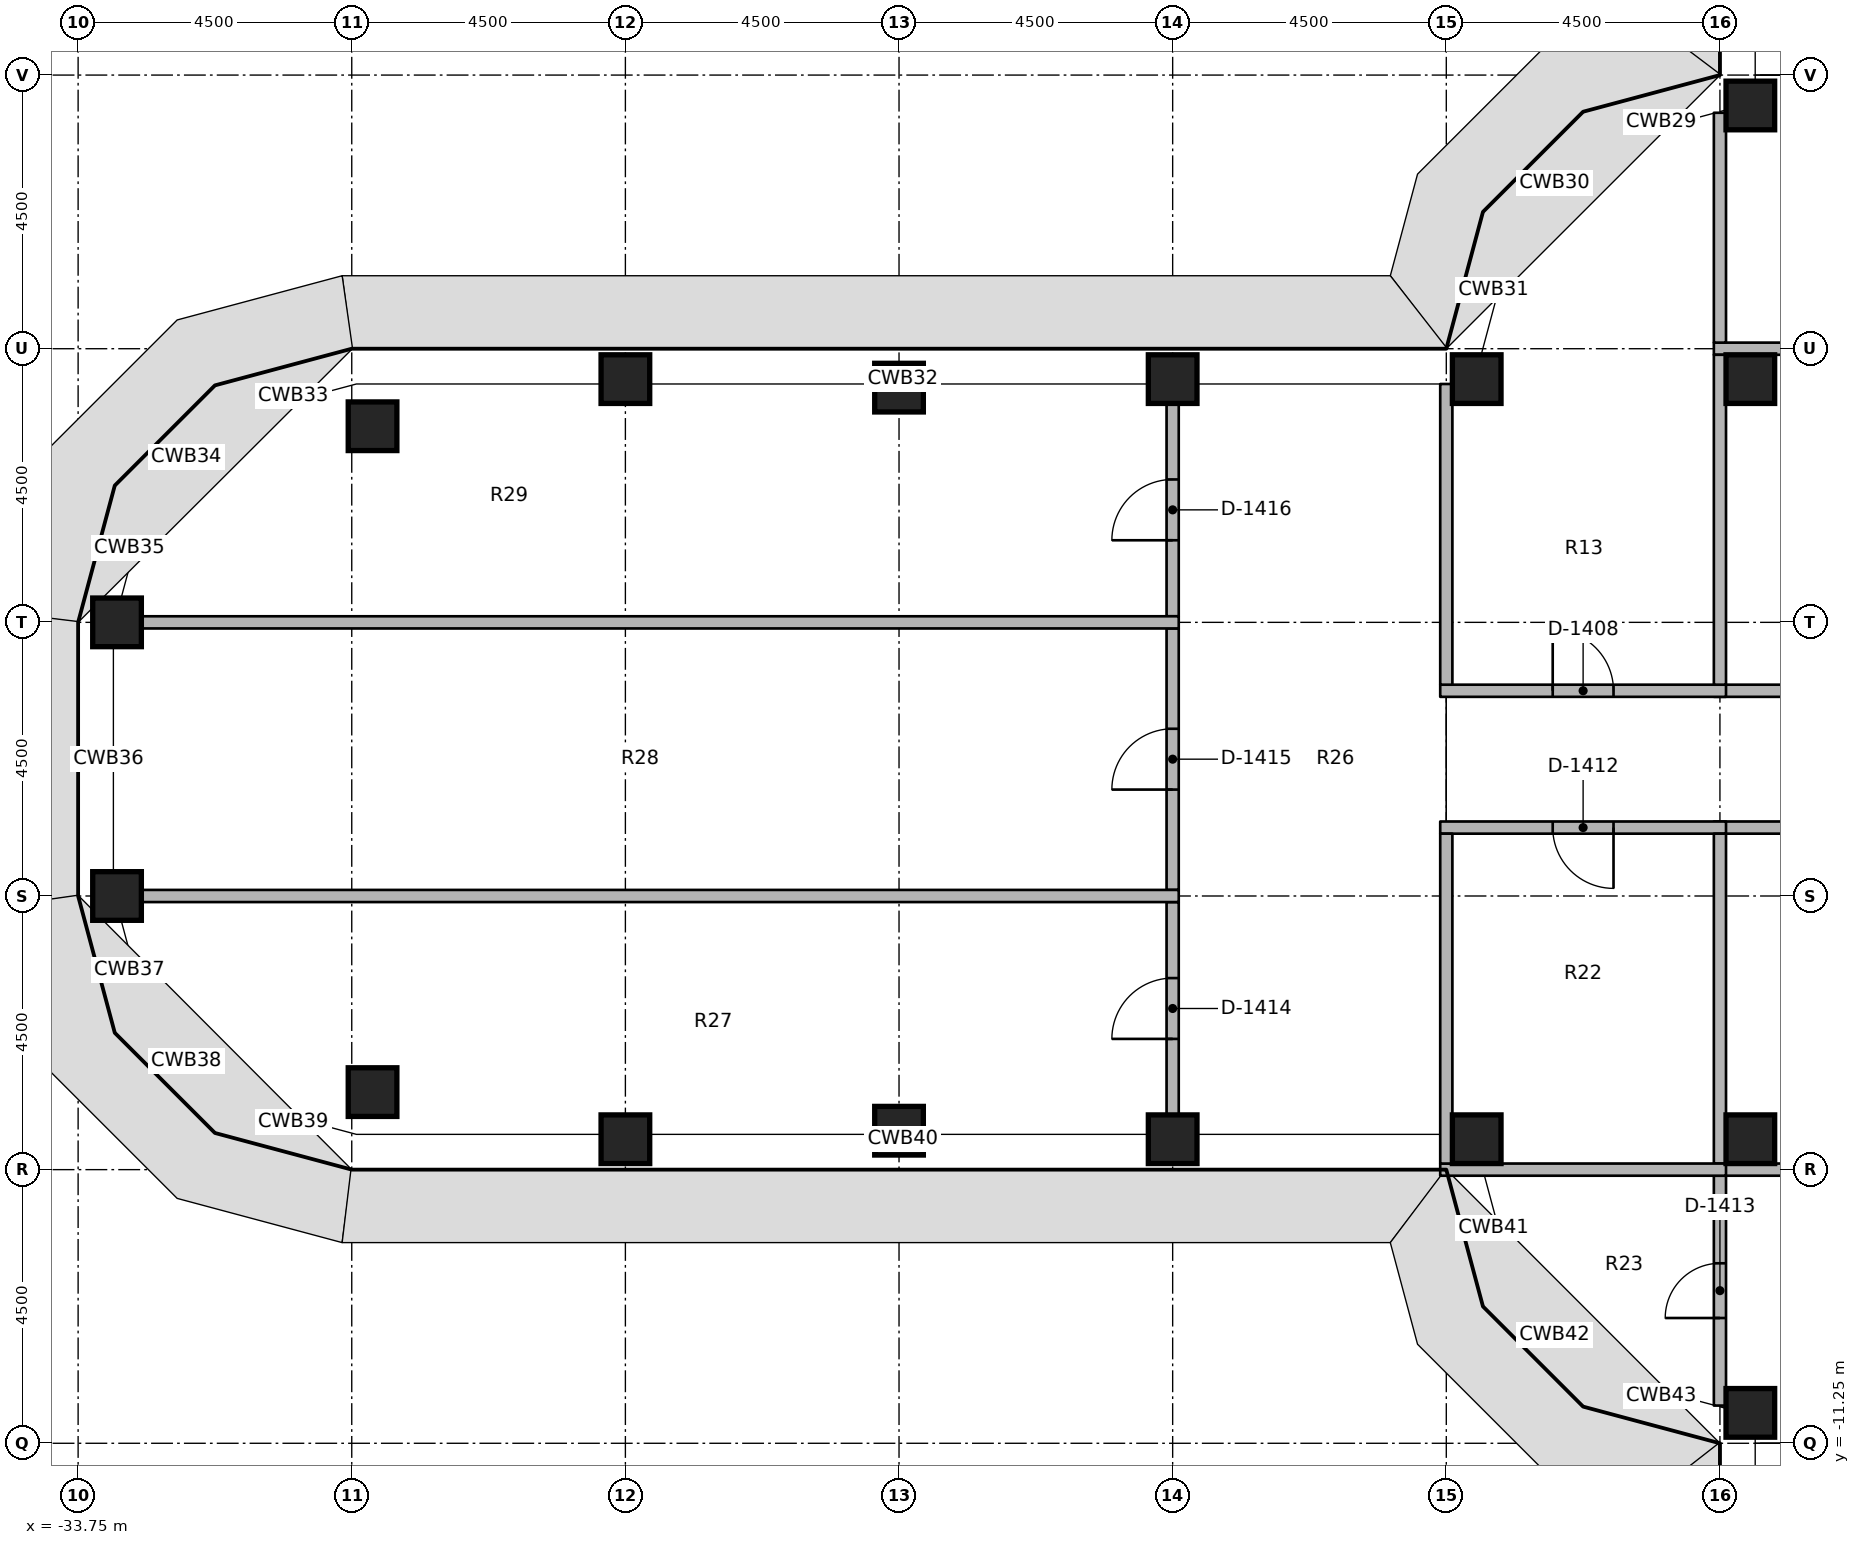
"""IFC4 building model, lengths in metres.
Left out: names, types, materials, properties, quantities, classifications, styles, units other than length and angle.
Written with IfcOpenShell. Run it as: python <this file> out.ifc"""

import sys

from ifc_helpers import new_model, si_unit, direction, frame, frame_2d, origin, origin_2d, place, context, subcontext, project, spatial, rectangle, extrude, element, fill, save


model = new_model("IFC4")
c1 = context("Model", 3, precision=1e-05, world=origin(), true_north=direction((0.0, 1.0)))
c2 = subcontext(c1, "Body", "Model", "MODEL_VIEW")
j1 = project(units=[si_unit("LENGTHUNIT", "METRE"), si_unit("PLANEANGLEUNIT", "RADIAN")], contexts=[c1])
p1 = place(None, origin())
s1 = spatial("IfcSite", under=j1, at=p1, CompositionType="ELEMENT")
p2 = place(p1, origin())
s2 = spatial("IfcBuilding", under=s1, at=p2, CompositionType="ELEMENT")
p3 = place(p2, frame((0.0, 0.0, 141.0)))
s3 = spatial("IfcBuildingStorey", under=s2, at=p3, CompositionType="ELEMENT", Elevation=141.0)
for number, where, z_axis, x_axis in (
    (1, (-33.11, -2.25, 0.0), (0.0, 0.0, 1.0), (1.0, 0.0, 0.0)),
    (2, (-33.11, 2.25, 0.0), (0.0, 0.0, 1.0), (1.0, 0.0, 0.0)),
    (3, (-28.908, -5.475, 0.0), (0.0, 0.0, 1.0), (1.0, 0.0, 0.0)),
    (4, (-28.908, 5.475, 0.0), (0.0, 0.0, 1.0), (1.0, 0.0, 0.0)),
    (5, (-24.75, -6.25, 0.0), (0.0, 0.0, 1.0), (1.0, 0.0, 0.0)),
    (6, (-24.75, 6.25, 0.0), (0.0, 0.0, 1.0), (1.0, 0.0, 0.0)),
    (7, (-20.25, -6.11, 0.0), (0.0, 0.0, 1.0), (1.0, 0.0, 0.0)),
    (8, (-20.25, 6.11, 0.0), (0.0, 0.0, 1.0), (1.0, 0.0, 0.0)),
    (9, (-15.75, -6.25, 0.0), (0.0, 0.0, 1.0), (1.0, 0.0, 0.0)),
    (10, (-15.75, 6.25, 0.0), (0.0, 0.0, 1.0), (1.0, 0.0, 0.0)),
    (11, (-10.75, -6.25, 0.0), (0.0, 0.0, 1.0), (1.0, 0.0, 0.0)),
    (12, (-10.75, 6.25, 0.0), (0.0, 0.0, 1.0), (1.0, 0.0, 0.0)),
    (13, (-6.25, -10.75, 0.0), (0.0, 0.0, 1.0), (1.0, 0.0, 0.0)),
    (14, (-6.25, -6.25, 0.0), (0.0, 0.0, 1.0), (1.0, 0.0, 0.0)),
    (15, (-6.25, 6.25, 0.0), (0.0, 0.0, 1.0), (1.0, 0.0, 0.0)),
    (16, (-6.25, 10.75, 0.0), (0.0, 0.0, 1.0), (1.0, 0.0, 0.0)),
):
    element("IfcColumn", number, at=place(p3, frame(where, z_axis=z_axis, x_axis=x_axis)), inside=s3, PredefinedType="COLUMN", context=c2, shape_type="SweptSolid", body=[
        extrude(rectangle(XDim=0.8, YDim=0.8, at=origin_2d()), origin(), (0.0, 0.0, 1.0), 3.65),
    ])
p4 = place(p3, frame((-6.85, 1.125, 0.0), z_axis=(0.0, 0.0, 1.0), x_axis=(1.0, 0.0, 0.0)))
e17 = element("IfcWall", 17, at=p4, inside=s3, PredefinedType="PARTITIONING", context=c2, shape_type="SweptSolid", body=[
    extrude(rectangle(XDim=5.825, YDim=0.2, at=frame_2d((2.913, 0.0))), origin(), (0.0, 0.0, 1.0), 2.75),
])
p5 = place(p4, frame((2.413, 0.0, 0.0)))
e18 = element("IfcOpeningElement", 18, at=p5, cuts=e17, PredefinedType="OPENING", context=c2, shape_type="SweptSolid", body=[
    extrude(rectangle(XDim=1.0, YDim=2.1, at=frame_2d((0.5, 1.05))), frame((0.0, 0.11, 0.0), z_axis=(0.0, -1.0, 0.0), x_axis=(1.0, 0.0, 0.0)), (0.0, 0.0, 1.0), 0.22),
])
p6 = place(p3, frame((-11.35, 1.125, 0.0), z_axis=(0.0, 0.0, 1.0), x_axis=(1.0, 0.0, 0.0)))
e19 = element("IfcWall", 19, at=p6, inside=s3, PredefinedType="PARTITIONING", context=c2, shape_type="SweptSolid", body=[
    extrude(rectangle(XDim=4.7, YDim=0.2, at=frame_2d((2.35, 0.0))), origin(), (0.0, 0.0, 1.0), 2.75),
])
p7 = place(p6, frame((1.85, 0.0, 0.0)))
e20 = element("IfcOpeningElement", 20, at=p7, cuts=e19, PredefinedType="OPENING", context=c2, shape_type="SweptSolid", body=[
    extrude(rectangle(XDim=1.0, YDim=2.1, at=frame_2d((0.5, 1.05))), frame((0.0, 0.11, 0.0), z_axis=(0.0, -1.0, 0.0), x_axis=(1.0, 0.0, 0.0)), (0.0, 0.0, 1.0), 0.22),
])
p8 = place(p3, frame((-1.025, -1.125, 0.0), z_axis=(0.0, 0.0, 1.0), x_axis=(-1.0, 0.0, 0.0)))
e21 = element("IfcWall", 21, at=p8, inside=s3, PredefinedType="PARTITIONING", context=c2, shape_type="SweptSolid", body=[
    extrude(rectangle(XDim=5.825, YDim=0.2, at=frame_2d((2.913, 0.0))), origin(), (0.0, 0.0, 1.0), 2.75),
])
p9 = place(p8, frame((2.413, 0.0, 0.0)))
e22 = element("IfcOpeningElement", 22, at=p9, cuts=e21, PredefinedType="OPENING", context=c2, shape_type="SweptSolid", body=[
    extrude(rectangle(XDim=1.0, YDim=2.1, at=frame_2d((0.5, 1.05))), frame((0.0, 0.11, 0.0), z_axis=(0.0, -1.0, 0.0), x_axis=(1.0, 0.0, 0.0)), (0.0, 0.0, 1.0), 0.22),
])
p10 = place(p3, frame((-6.65, -1.125, 0.0), z_axis=(0.0, 0.0, 1.0), x_axis=(-1.0, 0.0, 0.0)))
e23 = element("IfcWall", 23, at=p10, inside=s3, PredefinedType="PARTITIONING", context=c2, shape_type="SweptSolid", body=[
    extrude(rectangle(XDim=4.7, YDim=0.2, at=frame_2d((2.35, 0.0))), origin(), (0.0, 0.0, 1.0), 2.75),
])
p11 = place(p10, frame((1.85, 0.0, 0.0)))
e24 = element("IfcOpeningElement", 24, at=p11, cuts=e23, PredefinedType="OPENING", context=c2, shape_type="SweptSolid", body=[
    extrude(rectangle(XDim=1.0, YDim=2.1, at=frame_2d((0.5, 1.05))), frame((0.0, 0.11, 0.0), z_axis=(0.0, -1.0, 0.0), x_axis=(1.0, 0.0, 0.0)), (0.0, 0.0, 1.0), 0.22),
])
p12 = place(p3, frame((-6.85, 6.75, 0.0), z_axis=(0.0, 0.0, 1.0), x_axis=(1.0, 0.0, 0.0)))
e25 = element("IfcWall", 25, at=p12, inside=s3, PredefinedType="PARTITIONING", context=c2, shape_type="SweptSolid", body=[
    extrude(rectangle(XDim=5.825, YDim=0.2, at=frame_2d((2.913, 0.0))), origin(), (0.0, 0.0, 1.0), 2.75),
])
p13 = place(p3, frame((-6.75, 6.85, 0.0), z_axis=(0.0, 0.0, 1.0), x_axis=(0.0, 1.0, 0.0)))
e26 = element("IfcWall", 26, at=p13, inside=s3, PredefinedType="PARTITIONING", context=c2, shape_type="SweptSolid", body=[
    extrude(rectangle(XDim=3.78, YDim=0.2, at=frame_2d((1.89, 0.0))), origin(), (0.0, 0.0, 1.0), 2.75),
])
p14 = place(p3, frame((-6.85, -6.75, 0.0), z_axis=(0.0, 0.0, 1.0), x_axis=(1.0, 0.0, 0.0)))
e27 = element("IfcWall", 27, at=p14, inside=s3, PredefinedType="PARTITIONING", context=c2, shape_type="SweptSolid", body=[
    extrude(rectangle(XDim=5.825, YDim=0.2, at=frame_2d((2.913, 0.0))), origin(), (0.0, 0.0, 1.0), 2.75),
])
p15 = place(p3, frame((-6.75, -10.63, 0.0), z_axis=(0.0, 0.0, 1.0), x_axis=(0.0, 1.0, 0.0)))
e28 = element("IfcWall", 28, at=p15, inside=s3, PredefinedType="PARTITIONING", context=c2, shape_type="SweptSolid", body=[
    extrude(rectangle(XDim=3.78, YDim=0.2, at=frame_2d((1.89, 0.0))), origin(), (0.0, 0.0, 1.0), 2.75),
])
p16 = place(p15, frame((1.44, 0.0, 0.0)))
e29 = element("IfcOpeningElement", 29, at=p16, cuts=e28, PredefinedType="OPENING", context=c2, shape_type="SweptSolid", body=[
    extrude(rectangle(XDim=0.9, YDim=2.1, at=frame_2d((0.45, 1.05))), frame((0.0, 0.11, 0.0), z_axis=(0.0, -1.0, 0.0), x_axis=(1.0, 0.0, 0.0)), (0.0, 0.0, 1.0), 0.22),
])
p17 = place(p3, frame((-6.75, 1.225, 0.0), z_axis=(0.0, 0.0, 1.0), x_axis=(0.0, 1.0, 0.0)))
e30 = element("IfcWall", 30, at=p17, inside=s3, PredefinedType="PARTITIONING", context=c2, shape_type="SweptSolid", body=[
    extrude(rectangle(XDim=5.425, YDim=0.2, at=frame_2d((2.712, 0.0))), origin(), (0.0, 0.0, 1.0), 2.75),
])
p18 = place(p3, frame((-11.25, 1.225, 0.0), z_axis=(0.0, 0.0, 1.0), x_axis=(0.0, 1.0, 0.0)))
e31 = element("IfcWall", 31, at=p18, inside=s3, PredefinedType="PARTITIONING", context=c2, shape_type="SweptSolid", body=[
    extrude(rectangle(XDim=4.945, YDim=0.2, at=frame_2d((2.472, 0.0))), origin(), (0.0, 0.0, 1.0), 2.75),
])
p19 = place(p3, frame((-6.75, -6.65, 0.0), z_axis=(0.0, 0.0, 1.0), x_axis=(0.0, 1.0, 0.0)))
e32 = element("IfcWall", 32, at=p19, inside=s3, PredefinedType="PARTITIONING", context=c2, shape_type="SweptSolid", body=[
    extrude(rectangle(XDim=5.425, YDim=0.2, at=frame_2d((2.712, 0.0))), origin(), (0.0, 0.0, 1.0), 2.75),
])
p20 = place(p3, frame((-11.35, -6.75, 0.0), z_axis=(0.0, 0.0, 1.0), x_axis=(1.0, 0.0, 0.0)))
e33 = element("IfcWall", 33, at=p20, inside=s3, PredefinedType="PARTITIONING", context=c2, shape_type="SweptSolid", body=[
    extrude(rectangle(XDim=4.7, YDim=0.2, at=frame_2d((2.35, 0.0))), origin(), (0.0, 0.0, 1.0), 2.75),
])
p21 = place(p3, frame((-11.25, -6.65, 0.0), z_axis=(0.0, 0.0, 1.0), x_axis=(0.0, 1.0, 0.0)))
e34 = element("IfcWall", 34, at=p21, inside=s3, PredefinedType="PARTITIONING", context=c2, shape_type="SweptSolid", body=[
    extrude(rectangle(XDim=5.425, YDim=0.2, at=frame_2d((2.712, 0.0))), origin(), (0.0, 0.0, 1.0), 2.75),
])
p22 = place(p3, frame((-15.75, -5.85, 0.0), z_axis=(0.0, 0.0, 1.0), x_axis=(0.0, 1.0, 0.0)))
e35 = element("IfcWall", 35, at=p22, inside=s3, PredefinedType="PARTITIONING", context=c2, shape_type="SweptSolid", body=[
    extrude(rectangle(XDim=3.5, YDim=0.2, at=frame_2d((1.75, 0.0))), origin(), (0.0, 0.0, 1.0), 2.75),
])
p23 = place(p22, frame((1.25, 0.0, 0.0)))
e36 = element("IfcOpeningElement", 36, at=p23, cuts=e35, PredefinedType="OPENING", context=c2, shape_type="SweptSolid", body=[
    extrude(rectangle(XDim=1.0, YDim=2.1, at=frame_2d((0.5, 1.05))), frame((0.0, 0.11, 0.0), z_axis=(0.0, -1.0, 0.0), x_axis=(1.0, 0.0, 0.0)), (0.0, 0.0, 1.0), 0.22),
])
p24 = place(p3, frame((-15.75, -2.15, 0.0), z_axis=(0.0, 0.0, 1.0), x_axis=(0.0, 1.0, 0.0)))
e37 = element("IfcWall", 37, at=p24, inside=s3, PredefinedType="PARTITIONING", context=c2, shape_type="SweptSolid", body=[
    extrude(rectangle(XDim=4.3, YDim=0.2, at=frame_2d((2.15, 0.0))), origin(), (0.0, 0.0, 1.0), 2.75),
])
p25 = place(p24, frame((1.65, 0.0, 0.0)))
e38 = element("IfcOpeningElement", 38, at=p25, cuts=e37, PredefinedType="OPENING", context=c2, shape_type="SweptSolid", body=[
    extrude(rectangle(XDim=1.0, YDim=2.1, at=frame_2d((0.5, 1.05))), frame((0.0, 0.11, 0.0), z_axis=(0.0, -1.0, 0.0), x_axis=(1.0, 0.0, 0.0)), (0.0, 0.0, 1.0), 0.22),
])
p26 = place(p3, frame((-15.75, 2.35, 0.0), z_axis=(0.0, 0.0, 1.0), x_axis=(0.0, 1.0, 0.0)))
e39 = element("IfcWall", 39, at=p26, inside=s3, PredefinedType="PARTITIONING", context=c2, shape_type="SweptSolid", body=[
    extrude(rectangle(XDim=3.5, YDim=0.2, at=frame_2d((1.75, 0.0))), origin(), (0.0, 0.0, 1.0), 2.75),
])
p27 = place(p26, frame((1.25, 0.0, 0.0)))
e40 = element("IfcOpeningElement", 40, at=p27, cuts=e39, PredefinedType="OPENING", context=c2, shape_type="SweptSolid", body=[
    extrude(rectangle(XDim=1.0, YDim=2.1, at=frame_2d((0.5, 1.05))), frame((0.0, 0.11, 0.0), z_axis=(0.0, -1.0, 0.0), x_axis=(1.0, 0.0, 0.0)), (0.0, 0.0, 1.0), 0.22),
])
for number, where, z_axis, x_axis in (
    (41, (-32.71, -2.25, 0.0), (0.0, 0.0, 1.0), (1.0, 0.0, 0.0)),
    (42, (-32.71, 2.25, 0.0), (0.0, 0.0, 1.0), (1.0, 0.0, 0.0)),
):
    element("IfcWall", number, at=place(p3, frame(where, z_axis=z_axis, x_axis=x_axis)), inside=s3, PredefinedType="PARTITIONING", context=c2, shape_type="SweptSolid", body=[
        extrude(rectangle(XDim=17.06, YDim=0.2, at=frame_2d((8.53, 0.0))), origin(), (0.0, 0.0, 1.0), 2.75),
    ])
p28 = place(p7, origin())
e43 = element("IfcDoor", 43, at=p28, inside=s3, OperationType="SINGLE_SWING_RIGHT", PredefinedType="DOOR", context=c2, shape_type="SweptSolid", body=[
    extrude(rectangle(XDim=1.0, YDim=2.1, at=frame_2d((0.5, 1.05))), frame((0.0, 0.025, 0.0), z_axis=(0.0, -1.0, 0.0), x_axis=(1.0, 0.0, 0.0)), (0.0, 0.0, 1.0), 0.05),
])
fill(e20, e43)
p29 = place(p11, origin())
e44 = element("IfcDoor", 44, at=p29, inside=s3, OperationType="SINGLE_SWING_RIGHT", PredefinedType="DOOR", context=c2, shape_type="SweptSolid", body=[
    extrude(rectangle(XDim=1.0, YDim=2.1, at=frame_2d((0.5, 1.05))), frame((0.0, 0.025, 0.0), z_axis=(0.0, -1.0, 0.0), x_axis=(1.0, 0.0, 0.0)), (0.0, 0.0, 1.0), 0.05),
])
fill(e24, e44)
p30 = place(p16, origin())
e45 = element("IfcDoor", 45, at=p30, inside=s3, OperationType="SINGLE_SWING_RIGHT", PredefinedType="DOOR", context=c2, shape_type="SweptSolid", body=[
    extrude(rectangle(XDim=0.9, YDim=2.1, at=frame_2d((0.45, 1.05))), frame((0.0, 0.025, 0.0), z_axis=(0.0, -1.0, 0.0), x_axis=(1.0, 0.0, 0.0)), (0.0, 0.0, 1.0), 0.05),
])
fill(e29, e45)
p31 = place(p23, origin())
e46 = element("IfcDoor", 46, at=p31, inside=s3, OperationType="SINGLE_SWING_RIGHT", PredefinedType="DOOR", context=c2, shape_type="SweptSolid", body=[
    extrude(rectangle(XDim=1.0, YDim=2.1, at=frame_2d((0.5, 1.05))), frame((0.0, 0.025, 0.0), z_axis=(0.0, -1.0, 0.0), x_axis=(1.0, 0.0, 0.0)), (0.0, 0.0, 1.0), 0.05),
])
fill(e36, e46)
p32 = place(p25, origin())
e47 = element("IfcDoor", 47, at=p32, inside=s3, OperationType="SINGLE_SWING_RIGHT", PredefinedType="DOOR", context=c2, shape_type="SweptSolid", body=[
    extrude(rectangle(XDim=1.0, YDim=2.1, at=frame_2d((0.5, 1.05))), frame((0.0, 0.025, 0.0), z_axis=(0.0, -1.0, 0.0), x_axis=(1.0, 0.0, 0.0)), (0.0, 0.0, 1.0), 0.05),
])
fill(e38, e47)
p33 = place(p27, origin())
e48 = element("IfcDoor", 48, at=p33, inside=s3, OperationType="SINGLE_SWING_LEFT", PredefinedType="DOOR", context=c2, shape_type="SweptSolid", body=[
    extrude(rectangle(XDim=1.0, YDim=2.1, at=frame_2d((0.5, 1.05))), frame((0.0, 0.025, 0.0), z_axis=(0.0, -1.0, 0.0), x_axis=(1.0, 0.0, 0.0)), (0.0, 0.0, 1.0), 0.05),
])
fill(e40, e48)
save(model, sys.argv[1])
